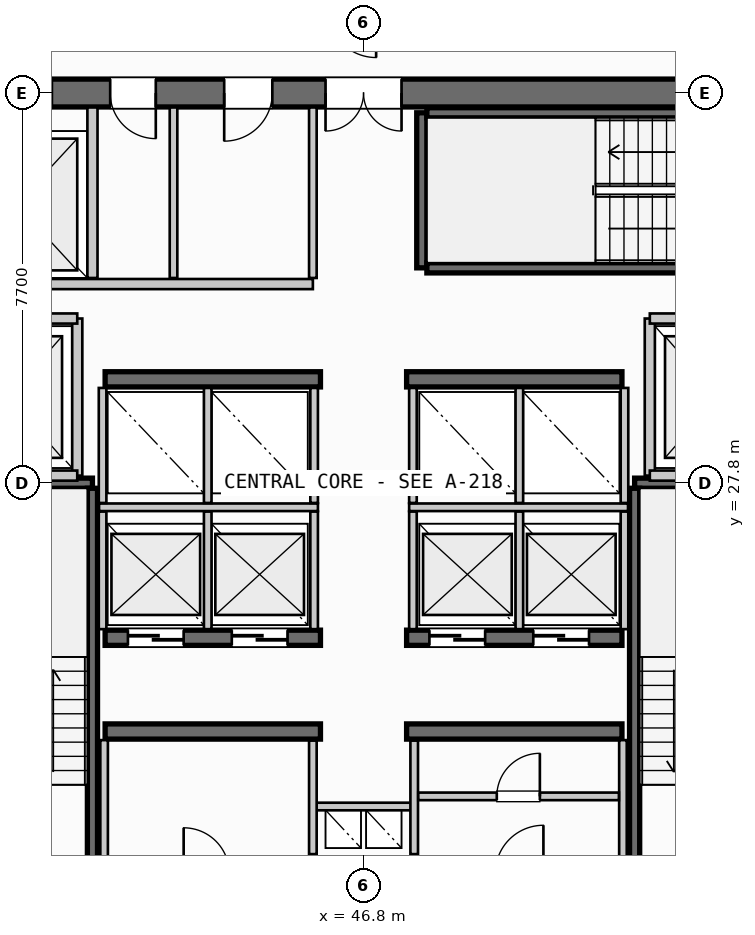
"""IFC4 building model, lengths in metres.
Left out: names, types, materials, properties, quantities, classifications, styles, units other than length and angle.
Written with IfcOpenShell. Run it as: python <this file> out.ifc"""

import sys

from ifc_helpers import new_model, si_unit, direction, frame, frame_2d, origin, place, context, subcontext, project, spatial, rectangle, extrude, source, transform, mapped, element, fill, save


model = new_model("IFC4")
c1 = context("Model", 3, precision=1e-05, world=origin(), true_north=direction((0.0, 1.0)))
c2 = subcontext(c1, "Body", "Model", "MODEL_VIEW")
j1 = project(units=[si_unit("LENGTHUNIT", "METRE"), si_unit("PLANEANGLEUNIT", "RADIAN")], contexts=[c1])
p1 = place(None, origin())
s1 = spatial("IfcSite", under=j1, at=p1, CompositionType="ELEMENT")
p2 = place(p1, origin())
s2 = spatial("IfcBuilding", under=s1, at=p2, CompositionType="ELEMENT")
p3 = place(p2, frame((0.0, 0.0, 132.35)))
s3 = spatial("IfcBuildingStorey", under=s2, at=p3, CompositionType="ELEMENT", Elevation=132.35)
p4 = place(p3, frame((55.6, 35.5, 0.0), z_axis=(0.0, 0.0, 1.0), x_axis=(-1.0, 0.0, 0.0)))
e1 = element("IfcWall", 1, at=p4, inside=s3, PredefinedType="SHEAR", context=c2, shape_type="SweptSolid", body=[
    extrude(rectangle(XDim=17.6, YDim=0.55, at=frame_2d((8.8, 0.0))), origin(), (0.0, 0.0, 1.0), 3.3),
])
p5 = place(p4, frame((8.05, 0.0, 0.0)))
e2 = element("IfcOpeningElement", 2, at=p5, cuts=e1, PredefinedType="OPENING", context=c2, shape_type="SweptSolid", body=[
    extrude(rectangle(XDim=1.5, YDim=2.2, at=frame_2d((0.75, 1.1))), frame((0.0, 0.285, 0.0), z_axis=(0.0, -1.0, 0.0), x_axis=(1.0, 0.0, 0.0)), (0.0, 0.0, 1.0), 0.57),
])
p6 = place(p4, frame((14.95, 0.0, 0.0)))
e3 = element("IfcOpeningElement", 3, at=p6, cuts=e1, PredefinedType="OPENING", context=c2, shape_type="SweptSolid", body=[
    extrude(rectangle(XDim=1.4, YDim=2.3, at=frame_2d((0.7, 1.15))), frame((0.0, 0.285, 0.0), z_axis=(0.0, -1.0, 0.0), x_axis=(1.0, 0.0, 0.0)), (0.0, 0.0, 1.0), 0.57),
])
p7 = place(p4, frame((12.9, 0.0, 0.0)))
e4 = element("IfcOpeningElement", 4, at=p7, cuts=e1, PredefinedType="OPENING", context=c2, shape_type="SweptSolid", body=[
    extrude(rectangle(XDim=0.9, YDim=2.15, at=frame_2d((0.45, 1.075))), frame((0.0, 0.285, 0.0), z_axis=(0.0, -1.0, 0.0), x_axis=(1.0, 0.0, 0.0)), (0.0, 0.0, 1.0), 0.57),
])
p8 = place(p4, frame((10.6, 0.0, 0.0)))
e5 = element("IfcOpeningElement", 5, at=p8, cuts=e1, PredefinedType="OPENING", context=c2, shape_type="SweptSolid", body=[
    extrude(rectangle(XDim=0.95, YDim=2.15, at=frame_2d((0.475, 1.075))), frame((0.0, 0.285, 0.0), z_axis=(0.0, -1.0, 0.0), x_axis=(1.0, 0.0, 0.0)), (0.0, 0.0, 1.0), 0.57),
])
for number, where, z_axis, x_axis in (
    (6, (41.7, 22.9, 0.0), (0.0, 0.0, 1.0), (1.0, 0.0, 0.0)),
    (7, (47.65, 22.9, 0.0), (0.0, 0.0, 1.0), (1.0, 0.0, 0.0)),
):
    element("IfcWall", number, at=place(p3, frame(where, z_axis=z_axis, x_axis=x_axis)), inside=s3, PredefinedType="SHEAR", context=c2, shape_type="SweptSolid", body=[
        extrude(rectangle(XDim=4.25, YDim=0.3, at=frame_2d((2.125, 0.0))), origin(), (0.0, 0.0, 1.0), 3.3),
    ])
p9 = place(p3, frame((41.7, 24.75, 0.0), z_axis=(0.0, 0.0, 1.0), x_axis=(1.0, 0.0, 0.0)))
e8 = element("IfcWall", 8, at=p9, inside=s3, PredefinedType="SHEAR", context=c2, shape_type="SweptSolid", body=[
    extrude(rectangle(XDim=4.25, YDim=0.3, at=frame_2d((2.125, 0.0))), origin(), (0.0, 0.0, 1.0), 3.3),
])
p10 = place(p9, frame((0.45, 0.0, 0.0)))
e9 = element("IfcOpeningElement", 9, at=p10, cuts=e8, PredefinedType="OPENING", context=c2, shape_type="SweptSolid", body=[
    extrude(rectangle(XDim=1.1, YDim=2.2, at=frame_2d((0.55, 1.1))), frame((0.0, 0.16, 0.0), z_axis=(0.0, -1.0, 0.0), x_axis=(1.0, 0.0, 0.0)), (0.0, 0.0, 1.0), 0.32),
])
p11 = place(p9, frame((2.5, 0.0, 0.0)))
e10 = element("IfcOpeningElement", 10, at=p11, cuts=e8, PredefinedType="OPENING", context=c2, shape_type="SweptSolid", body=[
    extrude(rectangle(XDim=1.1, YDim=2.2, at=frame_2d((0.55, 1.1))), frame((0.0, 0.16, 0.0), z_axis=(0.0, -1.0, 0.0), x_axis=(1.0, 0.0, 0.0)), (0.0, 0.0, 1.0), 0.32),
])
p12 = place(p3, frame((47.65, 24.75, 0.0), z_axis=(0.0, 0.0, 1.0), x_axis=(1.0, 0.0, 0.0)))
e11 = element("IfcWall", 11, at=p12, inside=s3, PredefinedType="SHEAR", context=c2, shape_type="SweptSolid", body=[
    extrude(rectangle(XDim=4.25, YDim=0.3, at=frame_2d((2.125, 0.0))), origin(), (0.0, 0.0, 1.0), 3.3),
])
p13 = place(p12, frame((0.45, 0.0, 0.0)))
e12 = element("IfcOpeningElement", 12, at=p13, cuts=e11, PredefinedType="OPENING", context=c2, shape_type="SweptSolid", body=[
    extrude(rectangle(XDim=1.1, YDim=2.2, at=frame_2d((0.55, 1.1))), frame((0.0, 0.16, 0.0), z_axis=(0.0, -1.0, 0.0), x_axis=(1.0, 0.0, 0.0)), (0.0, 0.0, 1.0), 0.32),
])
p14 = place(p12, frame((2.5, 0.0, 0.0)))
e13 = element("IfcOpeningElement", 13, at=p14, cuts=e11, PredefinedType="OPENING", context=c2, shape_type="SweptSolid", body=[
    extrude(rectangle(XDim=1.1, YDim=2.2, at=frame_2d((0.55, 1.1))), frame((0.0, 0.16, 0.0), z_axis=(0.0, -1.0, 0.0), x_axis=(1.0, 0.0, 0.0)), (0.0, 0.0, 1.0), 0.32),
])
for number, where, z_axis, x_axis in (
    (14, (41.7, 29.85, 0.0), (0.0, 0.0, 1.0), (1.0, 0.0, 0.0)),
    (15, (47.65, 29.85, 0.0), (0.0, 0.0, 1.0), (1.0, 0.0, 0.0)),
):
    element("IfcWall", number, at=place(p3, frame(where, z_axis=z_axis, x_axis=x_axis)), inside=s3, PredefinedType="SHEAR", context=c2, shape_type="SweptSolid", body=[
        extrude(rectangle(XDim=4.25, YDim=0.3, at=frame_2d((2.125, 0.0))), origin(), (0.0, 0.0, 1.0), 3.3),
    ])
p15 = place(p3, frame((38.39, 27.8, 0.0), z_axis=(0.0, 0.0, 1.0), x_axis=(1.0, 0.0, 0.0)))
e16 = element("IfcWall", 16, at=p15, inside=s3, PredefinedType="SHEAR", context=c2, shape_type="SweptSolid", body=[
    extrude(rectangle(XDim=3.06, YDim=0.2, at=frame_2d((1.53, 0.0))), origin(), (0.0, 0.0, 1.0), 3.3),
])
p16 = place(p3, frame((41.45, 27.7, 0.0), z_axis=(0.0, 0.0, 1.0), x_axis=(0.0, -1.0, 0.0)))
e17 = element("IfcWall", 17, at=p16, inside=s3, PredefinedType="SHEAR", context=c2, shape_type="SweptSolid", body=[
    extrude(rectangle(XDim=7.35, YDim=0.2, at=frame_2d((3.675, 0.0))), origin(), (0.0, 0.0, 1.0), 3.3),
])
p17 = place(p3, frame((52.15, 27.8, 0.0), z_axis=(0.0, 0.0, 1.0), x_axis=(1.0, 0.0, 0.0)))
e18 = element("IfcWall", 18, at=p17, inside=s3, PredefinedType="SHEAR", context=c2, shape_type="SweptSolid", body=[
    extrude(rectangle(XDim=3.06, YDim=0.2, at=frame_2d((1.53, 0.0))), origin(), (0.0, 0.0, 1.0), 3.3),
])
p18 = place(p3, frame((52.15, 20.35, 0.0), z_axis=(0.0, 0.0, 1.0), x_axis=(0.0, 1.0, 0.0)))
e19 = element("IfcWall", 19, at=p18, inside=s3, PredefinedType="SHEAR", context=c2, shape_type="SweptSolid", body=[
    extrude(rectangle(XDim=7.35, YDim=0.2, at=frame_2d((3.675, 0.0))), origin(), (0.0, 0.0, 1.0), 3.3),
])
p19 = place(p3, frame((47.95, 32.05, 0.0), z_axis=(0.0, 0.0, 1.0), x_axis=(0.0, 1.0, 0.0)))
e20 = element("IfcWall", 20, at=p19, inside=s3, PredefinedType="SHEAR", context=c2, shape_type="SweptSolid", body=[
    extrude(rectangle(XDim=3.06, YDim=0.2, at=frame_2d((1.53, 0.0))), origin(), (0.0, 0.0, 1.0), 3.3),
])
for number, where, z_axis, x_axis in (
    (21, (48.05, 35.11, 0.0), (0.0, 0.0, 1.0), (1.0, 0.0, 0.0)),
    (22, (55.4, 32.05, 0.0), (0.0, 0.0, 1.0), (-1.0, 0.0, 0.0)),
):
    element("IfcWall", number, at=place(p3, frame(where, z_axis=z_axis, x_axis=x_axis)), inside=s3, PredefinedType="SHEAR", context=c2, shape_type="SweptSolid", body=[
        extrude(rectangle(XDim=7.35, YDim=0.2, at=frame_2d((3.675, 0.0))), origin(), (0.0, 0.0, 1.0), 3.3),
    ])
p20 = place(p3, frame((45.8, 21.42, 0.0), z_axis=(0.0, 0.0, 1.0), x_axis=(1.0, 0.0, 0.0)))
e23 = element("IfcWall", 23, at=p20, inside=s3, PredefinedType="PARTITIONING", context=c2, shape_type="SweptSolid", body=[
    extrude(rectangle(XDim=2.0, YDim=0.15, at=frame_2d((1.0, 0.0))), origin(), (0.0, 0.0, 1.0), 2.445),
])
for number, where, z_axis, x_axis in (
    (24, (45.8, 20.48, 0.0), (0.0, 0.0, 1.0), (0.0, 1.0, 0.0)),
    (25, (47.8, 20.48, 0.0), (0.0, 0.0, 1.0), (0.0, 1.0, 0.0)),
):
    element("IfcWall", number, at=place(p3, frame(where, z_axis=z_axis, x_axis=x_axis)), inside=s3, PredefinedType="PARTITIONING", context=c2, shape_type="SweptSolid", body=[
        extrude(rectangle(XDim=2.24, YDim=0.15, at=frame_2d((1.12, 0.0))), origin(), (0.0, 0.0, 1.0), 2.445),
    ])
p21 = place(p3, frame((41.15, 27.95, 0.0), z_axis=(0.0, 0.0, 1.0), x_axis=(0.0, 1.0, 0.0)))
e26 = element("IfcWall", 26, at=p21, inside=s3, PredefinedType="PARTITIONING", context=c2, shape_type="SweptSolid", body=[
    extrude(rectangle(XDim=3.1, YDim=0.2, at=frame_2d((1.55, 0.0))), origin(), (0.0, 0.0, 1.0), 2.445),
])
for number, where, z_axis, x_axis in (
    (27, (38.285, 27.95, 0.0), (0.0, 0.0, 1.0), (1.0, 0.0, 0.0)),
    (28, (38.285, 31.05, 0.0), (0.0, 0.0, 1.0), (1.0, 0.0, 0.0)),
):
    element("IfcWall", number, at=place(p3, frame(where, z_axis=z_axis, x_axis=x_axis)), inside=s3, PredefinedType="PARTITIONING", context=c2, shape_type="SweptSolid", body=[
        extrude(rectangle(XDim=2.865, YDim=0.2, at=frame_2d((1.433, 0.0))), origin(), (0.0, 0.0, 1.0), 2.445),
    ])
p22 = place(p3, frame((52.45, 27.95, 0.0), z_axis=(0.0, 0.0, 1.0), x_axis=(0.0, 1.0, 0.0)))
e29 = element("IfcWall", 29, at=p22, inside=s3, PredefinedType="PARTITIONING", context=c2, shape_type="SweptSolid", body=[
    extrude(rectangle(XDim=3.1, YDim=0.2, at=frame_2d((1.55, 0.0))), origin(), (0.0, 0.0, 1.0), 2.445),
])
for number, where, z_axis, x_axis in (
    (30, (52.45, 27.95, 0.0), (0.0, 0.0, 1.0), (1.0, 0.0, 0.0)),
    (31, (52.45, 31.05, 0.0), (0.0, 0.0, 1.0), (1.0, 0.0, 0.0)),
):
    element("IfcWall", number, at=place(p3, frame(where, z_axis=z_axis, x_axis=x_axis)), inside=s3, PredefinedType="PARTITIONING", context=c2, shape_type="SweptSolid", body=[
        extrude(rectangle(XDim=2.865, YDim=0.2, at=frame_2d((1.433, 0.0))), origin(), (0.0, 0.0, 1.0), 2.445),
    ])
for number, where, z_axis, x_axis in (
    (32, (41.68, 20.385, 0.0), (0.0, 0.0, 1.0), (0.0, 1.0, 0.0)),
    (33, (51.92, 20.385, 0.0), (0.0, 0.0, 1.0), (0.0, 1.0, 0.0)),
):
    element("IfcWall", number, at=place(p3, frame(where, z_axis=z_axis, x_axis=x_axis)), inside=s3, PredefinedType="PARTITIONING", context=c2, shape_type="SweptSolid", body=[
        extrude(rectangle(XDim=2.345, YDim=0.15, at=frame_2d((1.172, 0.0))), origin(), (0.0, 0.0, 1.0), 2.445),
    ])
p23 = place(p3, frame((47.88, 21.62, 0.0), z_axis=(0.0, 0.0, 1.0), x_axis=(1.0, 0.0, 0.0)))
e34 = element("IfcWall", 34, at=p23, inside=s3, PredefinedType="PARTITIONING", context=c2, shape_type="SweptSolid", body=[
    extrude(rectangle(XDim=3.96, YDim=0.15, at=frame_2d((1.98, 0.0))), origin(), (0.0, 0.0, 1.0), 2.445),
])
p24 = place(p23, frame((1.55, 0.0, 0.0)))
e35 = element("IfcOpeningElement", 35, at=p24, cuts=e34, PredefinedType="OPENING", context=c2, shape_type="SweptSolid", body=[
    extrude(rectangle(XDim=0.85, YDim=2.15, at=frame_2d((0.425, 1.075))), frame((0.0, 0.085, 0.0), z_axis=(0.0, -1.0, 0.0), x_axis=(1.0, 0.0, 0.0)), (0.0, 0.0, 1.0), 0.17),
])
p25 = place(p3, frame((41.58, 27.325, 0.0), z_axis=(0.0, 0.0, 1.0), x_axis=(1.0, 0.0, 0.0)))
e36 = element("IfcWall", 36, at=p25, inside=s3, PredefinedType="PARTITIONING", context=c2, shape_type="SweptSolid", body=[
    extrude(rectangle(XDim=4.32, YDim=0.15, at=frame_2d((2.16, 0.0))), origin(), (0.0, 0.0, 1.0), 2.445),
])
p26 = place(p3, frame((47.7, 27.325, 0.0), z_axis=(0.0, 0.0, 1.0), x_axis=(1.0, 0.0, 0.0)))
e37 = element("IfcWall", 37, at=p26, inside=s3, PredefinedType="PARTITIONING", context=c2, shape_type="SweptSolid", body=[
    extrude(rectangle(XDim=4.32, YDim=0.15, at=frame_2d((2.16, 0.0))), origin(), (0.0, 0.0, 1.0), 2.445),
])
for number, where, z_axis, x_axis in (
    (38, (41.65, 24.92, 0.0), (0.0, 0.0, 1.0), (0.0, 1.0, 0.0)),
    (39, (43.725, 24.92, 0.0), (0.0, 0.0, 1.0), (0.0, 1.0, 0.0)),
    (40, (45.825, 24.92, 0.0), (0.0, 0.0, 1.0), (0.0, 1.0, 0.0)),
    (41, (47.775, 24.92, 0.0), (0.0, 0.0, 1.0), (0.0, 1.0, 0.0)),
    (42, (49.875, 24.92, 0.0), (0.0, 0.0, 1.0), (0.0, 1.0, 0.0)),
    (43, (51.95, 24.92, 0.0), (0.0, 0.0, 1.0), (0.0, 1.0, 0.0)),
):
    element("IfcWall", number, at=place(p3, frame(where, z_axis=z_axis, x_axis=x_axis)), inside=s3, PredefinedType="PARTITIONING", context=c2, shape_type="SweptSolid", body=[
        extrude(rectangle(XDim=2.32, YDim=0.15, at=frame_2d((1.16, 0.0))), origin(), (0.0, 0.0, 1.0), 2.445),
    ])
for number, where, z_axis, x_axis in (
    (44, (41.65, 27.41, 0.0), (0.0, 0.0, 1.0), (0.0, 1.0, 0.0)),
    (45, (43.725, 27.41, 0.0), (0.0, 0.0, 1.0), (0.0, 1.0, 0.0)),
    (46, (45.825, 27.41, 0.0), (0.0, 0.0, 1.0), (0.0, 1.0, 0.0)),
    (47, (47.775, 27.41, 0.0), (0.0, 0.0, 1.0), (0.0, 1.0, 0.0)),
    (48, (49.875, 27.41, 0.0), (0.0, 0.0, 1.0), (0.0, 1.0, 0.0)),
    (49, (51.95, 27.41, 0.0), (0.0, 0.0, 1.0), (0.0, 1.0, 0.0)),
):
    element("IfcWall", number, at=place(p3, frame(where, z_axis=z_axis, x_axis=x_axis)), inside=s3, PredefinedType="PARTITIONING", context=c2, shape_type="SweptSolid", body=[
        extrude(rectangle(XDim=2.27, YDim=0.15, at=frame_2d((1.135, 0.0))), origin(), (0.0, 0.0, 1.0), 2.445),
    ])
p27 = place(p3, frame((41.45, 31.85, 0.0), z_axis=(0.0, 0.0, 1.0), x_axis=(0.0, 1.0, 0.0)))
e50 = element("IfcWall", 50, at=p27, inside=s3, PredefinedType="PARTITIONING", context=c2, shape_type="SweptSolid", body=[
    extrude(rectangle(XDim=3.365, YDim=0.2, at=frame_2d((1.683, 0.0))), origin(), (0.0, 0.0, 1.0), 2.445),
])
p28 = place(p3, frame((38.285, 31.73, 0.0), z_axis=(0.0, 0.0, 1.0), x_axis=(1.0, 0.0, 0.0)))
e51 = element("IfcWall", 51, at=p28, inside=s3, PredefinedType="PARTITIONING", context=c2, shape_type="SweptSolid", body=[
    extrude(rectangle(XDim=7.515, YDim=0.2, at=frame_2d((3.758, 0.0))), origin(), (0.0, 0.0, 1.0), 2.445),
])
p29 = place(p3, frame((45.8, 31.85, 0.0), z_axis=(0.0, 0.0, 1.0), x_axis=(0.0, 1.0, 0.0)))
e52 = element("IfcWall", 52, at=p29, inside=s3, PredefinedType="PARTITIONING", context=c2, shape_type="SweptSolid", body=[
    extrude(rectangle(XDim=3.365, YDim=0.15, at=frame_2d((1.683, 0.0))), origin(), (0.0, 0.0, 1.0), 2.445),
])
p30 = place(p3, frame((43.05, 31.85, 0.0), z_axis=(0.0, 0.0, 1.0), x_axis=(0.0, 1.0, 0.0)))
e53 = element("IfcWall", 53, at=p30, inside=s3, PredefinedType="PLUMBINGWALL", context=c2, shape_type="SweptSolid", body=[
    extrude(rectangle(XDim=3.365, YDim=0.15, at=frame_2d((1.683, 0.0))), origin(), (0.0, 0.0, 1.0), 2.445),
])
m1 = source(origin(), c2, "Body", "SweptSolid", [
    extrude(rectangle(XDim=1.5, YDim=2.2, at=frame_2d((0.75, 1.1))), frame((0.0, 0.025, 0.0), z_axis=(0.0, -1.0, 0.0), x_axis=(1.0, 0.0, 0.0)), (0.0, 0.0, 1.0), 0.05),
])
p31 = place(p5, origin())
e54 = element("IfcDoor", 54, at=p31, inside=s3, OperationType="DOUBLE_DOOR_SINGLE_SWING", PredefinedType="DOOR", context=c2, shape_type="MappedRepresentation", body=[
    mapped(m1, transform((0.0, 0.0, 0.0), scale=1.0)),
])
fill(e2, e54)
m2 = source(origin(), c2, "Body", "SweptSolid", [
    extrude(rectangle(XDim=1.1, YDim=2.2, at=frame_2d((0.55, 1.1))), frame((0.0, 0.025, 0.0), z_axis=(0.0, -1.0, 0.0), x_axis=(1.0, 0.0, 0.0)), (0.0, 0.0, 1.0), 0.05),
])
p32 = place(p10, origin())
e55 = element("IfcDoor", 55, at=p32, inside=s3, OperationType="SLIDING_TO_RIGHT", PredefinedType="DOOR", context=c2, shape_type="MappedRepresentation", body=[
    mapped(m2, transform((0.0, 0.0, 0.0), scale=1.0)),
])
fill(e9, e55)
p33 = place(p11, origin())
e56 = element("IfcDoor", 56, at=p33, inside=s3, OperationType="SLIDING_TO_RIGHT", PredefinedType="DOOR", context=c2, shape_type="MappedRepresentation", body=[
    mapped(m2, transform((0.0, 0.0, 0.0), scale=1.0)),
])
fill(e10, e56)
p34 = place(p13, origin())
e57 = element("IfcDoor", 57, at=p34, inside=s3, OperationType="SLIDING_TO_RIGHT", PredefinedType="DOOR", context=c2, shape_type="MappedRepresentation", body=[
    mapped(m2, transform((0.0, 0.0, 0.0), scale=1.0)),
])
fill(e12, e57)
p35 = place(p14, origin())
e58 = element("IfcDoor", 58, at=p35, inside=s3, OperationType="SLIDING_TO_RIGHT", PredefinedType="DOOR", context=c2, shape_type="MappedRepresentation", body=[
    mapped(m2, transform((0.0, 0.0, 0.0), scale=1.0)),
])
fill(e13, e58)
m3 = source(origin(), c2, "Body", "SweptSolid", [
    extrude(rectangle(XDim=1.4, YDim=2.3, at=frame_2d((0.7, 1.15))), frame((0.0, 0.025, 0.0), z_axis=(0.0, -1.0, 0.0), x_axis=(1.0, 0.0, 0.0)), (0.0, 0.0, 1.0), 0.05),
])
p36 = place(p6, origin())
e59 = element("IfcDoor", 59, at=p36, inside=s3, OperationType="SLIDING_TO_RIGHT", PredefinedType="DOOR", context=c2, shape_type="MappedRepresentation", body=[
    mapped(m3, transform((0.0, 0.0, 0.0), scale=1.0)),
])
fill(e3, e59)
m4 = source(origin(), c2, "Body", "SweptSolid", [
    extrude(rectangle(XDim=0.9, YDim=2.15, at=frame_2d((0.45, 1.075))), frame((0.0, 0.025, 0.0), z_axis=(0.0, -1.0, 0.0), x_axis=(1.0, 0.0, 0.0)), (0.0, 0.0, 1.0), 0.05),
])
p37 = place(p7, origin())
e60 = element("IfcDoor", 60, at=p37, inside=s3, OperationType="SINGLE_SWING_LEFT", PredefinedType="DOOR", context=c2, shape_type="MappedRepresentation", body=[
    mapped(m4, transform((0.0, 0.0, 0.0), scale=1.0)),
])
fill(e4, e60)
m5 = source(origin(), c2, "Body", "SweptSolid", [
    extrude(rectangle(XDim=0.95, YDim=2.15, at=frame_2d((0.475, 1.075))), frame((0.0, 0.025, 0.0), z_axis=(0.0, -1.0, 0.0), x_axis=(1.0, 0.0, 0.0)), (0.0, 0.0, 1.0), 0.05),
])
p38 = place(p8, origin())
e61 = element("IfcDoor", 61, at=p38, inside=s3, OperationType="SINGLE_SWING_RIGHT", PredefinedType="DOOR", context=c2, shape_type="MappedRepresentation", body=[
    mapped(m5, transform((0.0, 0.0, 0.0), scale=1.0)),
])
fill(e5, e61)
m6 = source(origin(), c2, "Body", "SweptSolid", [
    extrude(rectangle(XDim=0.85, YDim=2.15, at=frame_2d((0.425, 1.075))), frame((0.0, 0.025, 0.0), z_axis=(0.0, -1.0, 0.0), x_axis=(1.0, 0.0, 0.0)), (0.0, 0.0, 1.0), 0.05),
])
p39 = place(p24, origin())
e62 = element("IfcDoor", 62, at=p39, inside=s3, OperationType="SINGLE_SWING_RIGHT", PredefinedType="DOOR", context=c2, shape_type="MappedRepresentation", body=[
    mapped(m6, transform((0.0, 0.0, 0.0), scale=1.0)),
])
fill(e35, e62)
save(model, sys.argv[1])
